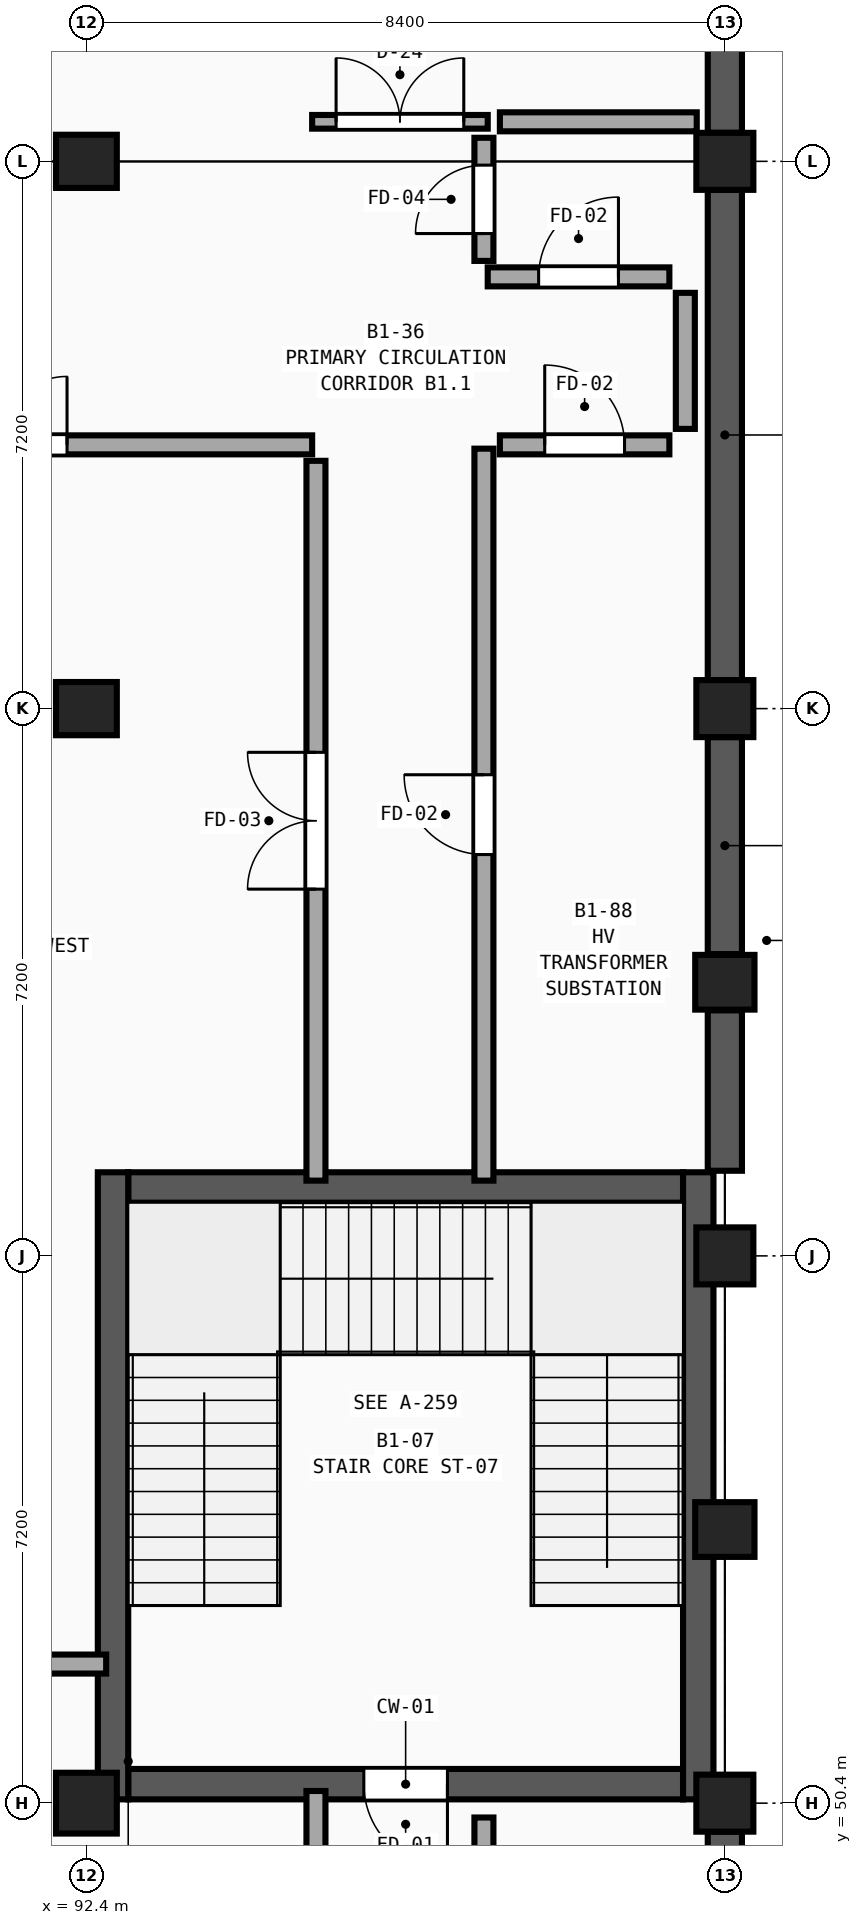
"""IFC4 building model, lengths in metres.
Left out: names, types, materials, properties, quantities, classifications, styles, units other than length and angle.
Written with IfcOpenShell. Run it as: python <this file> out.ifc"""

import sys

from ifc_helpers import new_model, si_unit, direction, frame, frame_2d, origin, origin_2d, place, context, subcontext, project, spatial, rectangle, circle, extrude, element, fill, save


model = new_model("IFC4")
c1 = context("Model", 3, precision=1e-05, world=origin(), true_north=direction((0.0, 1.0)))
c2 = subcontext(c1, "Body", "Model", "MODEL_VIEW")
j1 = project(units=[si_unit("LENGTHUNIT", "METRE"), si_unit("PLANEANGLEUNIT", "RADIAN")], contexts=[c1])
p1 = place(None, origin())
s1 = spatial("IfcSite", under=j1, at=p1, CompositionType="ELEMENT")
p2 = place(p1, origin())
s2 = spatial("IfcBuilding", under=s1, at=p2, CompositionType="ELEMENT")
p3 = place(p2, frame((0.0, 0.0, -5.4)))
s3 = spatial("IfcBuildingStorey", under=s2, at=p3, CompositionType="ELEMENT", Elevation=-5.4)
for number, where, z_axis, x_axis in (
    (1, (92.4, 64.8, 0.0), (0.0, 0.0, 1.0), (1.0, 0.0, 0.0)),
    (2, (92.4, 72.0, 0.0), (0.0, 0.0, 1.0), (1.0, 0.0, 0.0)),
):
    element("IfcColumn", number, at=place(p3, frame(where, z_axis=z_axis, x_axis=x_axis)), inside=s3, PredefinedType="COLUMN", context=c2, shape_type="SweptSolid", body=[
        extrude(rectangle(XDim=0.8, YDim=0.7, at=origin_2d()), origin(), (0.0, 0.0, 1.0), 5.4),
    ])
for number, where, z_axis, x_axis in (
    (3, (100.8, 50.4, 0.0), (0.0, 0.0, 1.0), (1.0, 0.0, 0.0)),
    (4, (100.8, 57.6, 0.0), (0.0, 0.0, 1.0), (1.0, 0.0, 0.0)),
    (5, (100.8, 64.8, 0.0), (0.0, 0.0, 1.0), (1.0, 0.0, 0.0)),
    (6, (100.8, 72.0, 0.0), (0.0, 0.0, 1.0), (1.0, 0.0, 0.0)),
):
    element("IfcColumn", number, at=place(p3, frame(where, z_axis=z_axis, x_axis=x_axis)), inside=s3, PredefinedType="COLUMN", context=c2, shape_type="SweptSolid", body=[
        extrude(rectangle(XDim=0.75, YDim=0.75, at=origin_2d()), origin(), (0.0, 0.0, 1.0), 5.4),
    ])
for number, where, z_axis, x_axis in (
    (7, (100.8, 54.0, 0.0), (0.0, 0.0, 1.0), (1.0, 0.0, 0.0)),
    (8, (100.8, 61.2, 0.0), (0.0, 0.0, 1.0), (1.0, 0.0, 0.0)),
):
    element("IfcColumn", number, at=place(p3, frame(where, z_axis=z_axis, x_axis=x_axis)), inside=s3, PredefinedType="PILASTER", context=c2, shape_type="SweptSolid", body=[
        extrude(rectangle(XDim=0.78, YDim=0.72, at=origin_2d()), origin(), (0.0, 0.0, 1.0), 5.4),
    ])
p4 = place(p3, frame((92.4, 50.4, 0.0), z_axis=(0.0, 0.0, 1.0), x_axis=(1.0, 0.0, 0.0)))
e9 = element("IfcColumn", 9, at=p4, inside=s3, PredefinedType="COLUMN", context=c2, shape_type="SweptSolid", body=[
    extrude(circle(Radius=0.4, at=origin_2d()), origin(), (0.0, 0.0, 1.0), 5.4),
])
p5 = place(p3, frame((100.8, 50.025, 0.0), z_axis=(0.0, 0.0, 1.0), x_axis=(0.0, -1.0, 0.0)))
e10 = element("IfcWall", 10, at=p5, inside=s3, PredefinedType="USERDEFINED", context=c2, shape_type="SweptSolid", body=[
    extrude(rectangle(XDim=6.45, YDim=0.45, at=frame_2d((3.225, 0.0))), origin(), (0.0, 0.0, 1.0), 4.5),
])
p6 = place(p3, frame((100.8, 64.425, 0.0), z_axis=(0.0, 0.0, 1.0), x_axis=(0.0, -1.0, 0.0)))
e11 = element("IfcWall", 11, at=p6, inside=s3, PredefinedType="USERDEFINED", context=c2, shape_type="SweptSolid", body=[
    extrude(rectangle(XDim=2.855, YDim=0.45, at=frame_2d((1.427, 0.0))), origin(), (0.0, 0.0, 1.0), 4.5),
])
p7 = place(p3, frame((100.8, 60.83, 0.0), z_axis=(0.0, 0.0, 1.0), x_axis=(0.0, -1.0, 0.0)))
e12 = element("IfcWall", 12, at=p7, inside=s3, PredefinedType="USERDEFINED", context=c2, shape_type="SweptSolid", body=[
    extrude(rectangle(XDim=2.11, YDim=0.45, at=frame_2d((1.055, 0.0))), origin(), (0.0, 0.0, 1.0), 4.5),
])
for number, where, z_axis, x_axis in (
    (13, (100.8, 71.625, 0.0), (0.0, 0.0, 1.0), (0.0, -1.0, 0.0)),
    (14, (100.8, 78.825, 0.0), (0.0, 0.0, 1.0), (0.0, -1.0, 0.0)),
):
    element("IfcWall", number, at=place(p3, frame(where, z_axis=z_axis, x_axis=x_axis)), inside=s3, PredefinedType="USERDEFINED", context=c2, shape_type="SweptSolid", body=[
        extrude(rectangle(XDim=6.45, YDim=0.45, at=frame_2d((3.225, 0.0))), origin(), (0.0, 0.0, 1.0), 4.5),
    ])
p8 = place(p3, frame((100.25, 50.65, 0.0), z_axis=(0.0, 0.0, 1.0), x_axis=(-1.0, 0.0, 0.0)))
e15 = element("IfcWall", 15, at=p8, inside=s3, PredefinedType="SHEAR", context=c2, shape_type="SweptSolid", body=[
    extrude(rectangle(XDim=7.3, YDim=0.4, at=frame_2d((3.65, 0.0))), origin(), (0.0, 0.0, 1.0), 5.4),
])
p9 = place(p8, frame((3.1, 0.0, 0.0)))
e16 = element("IfcOpeningElement", 16, at=p9, cuts=e15, PredefinedType="OPENING", context=c2, shape_type="SweptSolid", body=[
    extrude(rectangle(XDim=1.1, YDim=2.2, at=frame_2d((0.55, 1.1))), frame((0.0, 0.22, 0.0), z_axis=(0.0, -1.0, 0.0), x_axis=(1.0, 0.0, 0.0)), (0.0, 0.0, 1.0), 0.44),
])
p10 = place(p3, frame((92.95, 58.5, 0.0), z_axis=(0.0, 0.0, 1.0), x_axis=(1.0, 0.0, 0.0)))
e17 = element("IfcWall", 17, at=p10, inside=s3, PredefinedType="SHEAR", context=c2, shape_type="SweptSolid", body=[
    extrude(rectangle(XDim=7.3, YDim=0.4, at=frame_2d((3.65, 0.0))), origin(), (0.0, 0.0, 1.0), 5.4),
])
for number, where, z_axis, x_axis in (
    (18, (92.75, 58.7, 0.0), (0.0, 0.0, 1.0), (0.0, -1.0, 0.0)),
    (19, (100.45, 50.45, 0.0), (0.0, 0.0, 1.0), (0.0, 1.0, 0.0)),
):
    element("IfcWall", number, at=place(p3, frame(where, z_axis=z_axis, x_axis=x_axis)), inside=s3, PredefinedType="SHEAR", context=c2, shape_type="SweptSolid", body=[
        extrude(rectangle(XDim=8.25, YDim=0.4, at=frame_2d((4.125, 0.0))), origin(), (0.0, 0.0, 1.0), 5.4),
    ])
p11 = place(p3, frame((95.42, 36.37, 0.0), z_axis=(0.0, 0.0, 1.0), x_axis=(0.0, 1.0, 0.0)))
e20 = element("IfcWall", 20, at=p11, inside=s3, PredefinedType="SOLIDWALL", context=c2, shape_type="SweptSolid", body=[
    extrude(rectangle(XDim=14.19, YDim=0.25, at=frame_2d((7.095, 0.0))), origin(), (0.0, 0.0, 1.0), 5.05),
])
p12 = place(p11, frame((6.195, 0.0, 0.0)))
e21 = element("IfcOpeningElement", 21, at=p12, cuts=e20, PredefinedType="OPENING", context=c2, shape_type="SweptSolid", body=[
    extrude(rectangle(XDim=1.8, YDim=2.3, at=frame_2d((0.9, 1.15))), frame((0.0, 0.145, 0.0), z_axis=(0.0, -1.0, 0.0), x_axis=(1.0, 0.0, 0.0)), (0.0, 0.0, 1.0), 0.29),
])
p13 = place(p3, frame((97.63, 36.37, 0.0), z_axis=(0.0, 0.0, 1.0), x_axis=(0.0, 1.0, 0.0)))
e22 = element("IfcWall", 22, at=p13, inside=s3, PredefinedType="SOLIDWALL", context=c2, shape_type="SweptSolid", body=[
    extrude(rectangle(XDim=13.841, YDim=0.25, at=frame_2d((6.921, 0.0))), origin(), (0.0, 0.0, 1.0), 5.05),
])
p14 = place(p13, frame((6.396, 0.0, 0.0)))
e23 = element("IfcOpeningElement", 23, at=p14, cuts=e22, PredefinedType="OPENING", context=c2, shape_type="SweptSolid", body=[
    extrude(rectangle(XDim=1.05, YDim=2.15, at=frame_2d((0.525, 1.075))), frame((0.0, 0.145, 0.0), z_axis=(0.0, -1.0, 0.0), x_axis=(1.0, 0.0, 0.0)), (0.0, 0.0, 1.0), 0.29),
])
p15 = place(p3, frame((97.63, 58.59, 0.0), z_axis=(0.0, 0.0, 1.0), x_axis=(0.0, 1.0, 0.0)))
e24 = element("IfcWall", 24, at=p15, inside=s3, PredefinedType="SOLIDWALL", context=c2, shape_type="SweptSolid", body=[
    extrude(rectangle(XDim=9.63, YDim=0.25, at=frame_2d((4.815, 0.0))), origin(), (0.0, 0.0, 1.0), 5.05),
])
p16 = place(p15, frame((4.29, 0.0, 0.0)))
e25 = element("IfcOpeningElement", 25, at=p16, cuts=e24, PredefinedType="OPENING", context=c2, shape_type="SweptSolid", body=[
    extrude(rectangle(XDim=1.05, YDim=2.15, at=frame_2d((0.525, 1.075))), frame((0.0, 0.145, 0.0), z_axis=(0.0, -1.0, 0.0), x_axis=(1.0, 0.0, 0.0)), (0.0, 0.0, 1.0), 0.29),
])
p17 = place(p3, frame((95.42, 58.59, 0.0), z_axis=(0.0, 0.0, 1.0), x_axis=(0.0, 1.0, 0.0)))
e26 = element("IfcWall", 26, at=p17, inside=s3, PredefinedType="SOLIDWALL", context=c2, shape_type="SweptSolid", body=[
    extrude(rectangle(XDim=9.47, YDim=0.25, at=frame_2d((4.735, 0.0))), origin(), (0.0, 0.0, 1.0), 5.05),
])
p18 = place(p17, frame((3.835, 0.0, 0.0)))
e27 = element("IfcOpeningElement", 27, at=p18, cuts=e26, PredefinedType="OPENING", context=c2, shape_type="SweptSolid", body=[
    extrude(rectangle(XDim=1.8, YDim=2.3, at=frame_2d((0.9, 1.15))), frame((0.0, 0.145, 0.0), z_axis=(0.0, -1.0, 0.0), x_axis=(1.0, 0.0, 0.0)), (0.0, 0.0, 1.0), 0.29),
])
p19 = place(p3, frame((87.12, 68.27, 0.0), z_axis=(0.0, 0.0, 1.0), x_axis=(1.0, 0.0, 0.0)))
e28 = element("IfcWall", 28, at=p19, inside=s3, PredefinedType="SOLIDWALL", context=c2, shape_type="SweptSolid", body=[
    extrude(rectangle(XDim=8.25, YDim=0.25, at=frame_2d((4.125, 0.0))), origin(), (0.0, 0.0, 1.0), 5.05),
])
p20 = place(p19, frame((3.225, 0.0, 0.0)))
e29 = element("IfcOpeningElement", 29, at=p20, cuts=e28, PredefinedType="OPENING", context=c2, shape_type="SweptSolid", body=[
    extrude(rectangle(XDim=1.8, YDim=2.3, at=frame_2d((0.9, 1.15))), frame((0.0, 0.145, 0.0), z_axis=(0.0, -1.0, 0.0), x_axis=(1.0, 0.0, 0.0)), (0.0, 0.0, 1.0), 0.29),
])
p21 = place(p3, frame((97.68, 70.48, 0.0), z_axis=(0.0, 0.0, 1.0), x_axis=(1.0, 0.0, 0.0)))
e30 = element("IfcWall", 30, at=p21, inside=s3, PredefinedType="SOLIDWALL", context=c2, shape_type="SweptSolid", body=[
    extrude(rectangle(XDim=2.39, YDim=0.25, at=frame_2d((1.195, 0.0))), origin(), (0.0, 0.0, 1.0), 5.05),
])
p22 = place(p21, frame((0.67, 0.0, 0.0)))
e31 = element("IfcOpeningElement", 31, at=p22, cuts=e30, PredefinedType="OPENING", context=c2, shape_type="SweptSolid", body=[
    extrude(rectangle(XDim=1.05, YDim=2.15, at=frame_2d((0.525, 1.075))), frame((0.0, 0.145, 0.0), z_axis=(0.0, -1.0, 0.0), x_axis=(1.0, 0.0, 0.0)), (0.0, 0.0, 1.0), 0.29),
])
p23 = place(p3, frame((95.37, 72.52, 0.0), z_axis=(0.0, 0.0, 1.0), x_axis=(1.0, 0.0, 0.0)))
e32 = element("IfcWall", 32, at=p23, inside=s3, PredefinedType="PARTITIONING", context=c2, shape_type="SweptSolid", body=[
    extrude(rectangle(XDim=2.31, YDim=0.18, at=frame_2d((1.155, 0.0))), origin(), (0.0, 0.0, 1.0), 4.55),
])
p24 = place(p23, frame((0.315, 0.0, 0.0)))
e33 = element("IfcOpeningElement", 33, at=p24, cuts=e32, PredefinedType="OPENING", context=c2, shape_type="SweptSolid", body=[
    extrude(rectangle(XDim=1.68, YDim=2.29, at=frame_2d((0.84, 1.145))), frame((0.0, 0.11, 0.0), z_axis=(0.0, -1.0, 0.0), x_axis=(1.0, 0.0, 0.0)), (0.0, 0.0, 1.0), 0.22),
])
p25 = place(p3, frame((97.84, 68.27, 0.0), z_axis=(0.0, 0.0, 1.0), x_axis=(1.0, 0.0, 0.0)))
e34 = element("IfcWall", 34, at=p25, inside=s3, PredefinedType="SOLIDWALL", context=c2, shape_type="SweptSolid", body=[
    extrude(rectangle(XDim=2.23, YDim=0.25, at=frame_2d((1.115, 0.0))), origin(), (0.0, 0.0, 1.0), 5.05),
])
p26 = place(p25, frame((0.59, 0.0, 0.0)))
e35 = element("IfcOpeningElement", 35, at=p26, cuts=e34, PredefinedType="OPENING", context=c2, shape_type="SweptSolid", body=[
    extrude(rectangle(XDim=1.05, YDim=2.15, at=frame_2d((0.525, 1.075))), frame((0.0, 0.145, 0.0), z_axis=(0.0, -1.0, 0.0), x_axis=(1.0, 0.0, 0.0)), (0.0, 0.0, 1.0), 0.29),
])
p27 = place(p3, frame((100.28, 68.48, 0.0), z_axis=(0.0, 0.0, 1.0), x_axis=(0.0, 1.0, 0.0)))
e36 = element("IfcWall", 36, at=p27, inside=s3, PredefinedType="SOLIDWALL", context=c2, shape_type="SweptSolid", body=[
    extrude(rectangle(XDim=1.79, YDim=0.25, at=frame_2d((0.895, 0.0))), origin(), (0.0, 0.0, 1.0), 4.5),
])
p28 = place(p3, frame((97.63, 70.69, 0.0), z_axis=(0.0, 0.0, 1.0), x_axis=(0.0, 1.0, 0.0)))
e37 = element("IfcWall", 37, at=p28, inside=s3, PredefinedType="SOLIDWALL", context=c2, shape_type="SweptSolid", body=[
    extrude(rectangle(XDim=1.62, YDim=0.25, at=frame_2d((0.81, 0.0))), origin(), (0.0, 0.0, 1.0), 5.05),
])
p29 = place(p28, frame((0.36, 0.0, 0.0)))
e38 = element("IfcOpeningElement", 38, at=p29, cuts=e37, PredefinedType="OPENING", context=c2, shape_type="SweptSolid", body=[
    extrude(rectangle(XDim=0.9, YDim=2.1, at=frame_2d((0.45, 1.05))), frame((0.0, 0.145, 0.0), z_axis=(0.0, -1.0, 0.0), x_axis=(1.0, 0.0, 0.0)), (0.0, 0.0, 1.0), 0.29),
])
p30 = place(p3, frame((87.38, 52.23, 0.0), z_axis=(0.0, 0.0, 1.0), x_axis=(1.0, 0.0, 0.0)))
e39 = element("IfcWall", 39, at=p30, inside=s3, PredefinedType="SOLIDWALL", context=c2, shape_type="SweptSolid", body=[
    extrude(rectangle(XDim=5.28, YDim=0.25, at=frame_2d((2.64, 0.0))), origin(), (0.0, 0.0, 1.0), 5.05),
])
p31 = place(p3, frame((97.84, 72.52, 0.0), z_axis=(0.0, 0.0, 1.0), x_axis=(1.0, 0.0, 0.0)))
e40 = element("IfcWall", 40, at=p31, inside=s3, PredefinedType="SOLIDWALL", context=c2, shape_type="SweptSolid", body=[
    extrude(rectangle(XDim=2.59, YDim=0.25, at=frame_2d((1.295, 0.0))), origin(), (0.0, 0.0, 1.0), 4.55),
])
p32 = place(p9, origin())
e41 = element("IfcDoor", 41, at=p32, inside=s3, OperationType="SINGLE_SWING_LEFT", PredefinedType="DOOR", context=c2, shape_type="SweptSolid", body=[
    extrude(rectangle(XDim=1.1, YDim=2.2, at=frame_2d((0.55, 1.1))), frame((0.0, 0.025, 0.0), z_axis=(0.0, -1.0, 0.0), x_axis=(1.0, 0.0, 0.0)), (0.0, 0.0, 1.0), 0.05),
])
fill(e16, e41)
p33 = place(p16, origin())
e42 = element("IfcDoor", 42, at=p33, inside=s3, OperationType="SINGLE_SWING_RIGHT", PredefinedType="DOOR", context=c2, shape_type="SweptSolid", body=[
    extrude(rectangle(XDim=1.05, YDim=2.15, at=frame_2d((0.525, 1.075))), frame((0.0, 0.025, 0.0), z_axis=(0.0, -1.0, 0.0), x_axis=(1.0, 0.0, 0.0)), (0.0, 0.0, 1.0), 0.05),
])
fill(e25, e42)
p34 = place(p18, origin())
e43 = element("IfcDoor", 43, at=p34, inside=s3, OperationType="DOUBLE_DOOR_SINGLE_SWING", PredefinedType="DOOR", context=c2, shape_type="SweptSolid", body=[
    extrude(rectangle(XDim=1.8, YDim=2.3, at=frame_2d((0.9, 1.15))), frame((0.0, 0.025, 0.0), z_axis=(0.0, -1.0, 0.0), x_axis=(1.0, 0.0, 0.0)), (0.0, 0.0, 1.0), 0.05),
])
fill(e27, e43)
p35 = place(p20, origin())
e44 = element("IfcDoor", 44, at=p35, inside=s3, OperationType="DOUBLE_DOOR_SINGLE_SWING", PredefinedType="DOOR", context=c2, shape_type="SweptSolid", body=[
    extrude(rectangle(XDim=1.8, YDim=2.3, at=frame_2d((0.9, 1.15))), frame((0.0, 0.025, 0.0), z_axis=(0.0, -1.0, 0.0), x_axis=(1.0, 0.0, 0.0)), (0.0, 0.0, 1.0), 0.05),
])
fill(e29, e44)
p36 = place(p22, origin())
e45 = element("IfcDoor", 45, at=p36, inside=s3, OperationType="SINGLE_SWING_RIGHT", PredefinedType="DOOR", context=c2, shape_type="SweptSolid", body=[
    extrude(rectangle(XDim=1.05, YDim=2.15, at=frame_2d((0.525, 1.075))), frame((0.0, 0.025, 0.0), z_axis=(0.0, -1.0, 0.0), x_axis=(1.0, 0.0, 0.0)), (0.0, 0.0, 1.0), 0.05),
])
fill(e31, e45)
p37 = place(p24, origin())
e46 = element("IfcDoor", 46, at=p37, inside=s3, OperationType="DOUBLE_DOOR_SINGLE_SWING", PredefinedType="DOOR", context=c2, shape_type="SweptSolid", body=[
    extrude(rectangle(XDim=1.68, YDim=2.29, at=frame_2d((0.84, 1.145))), frame((0.0, 0.025, 0.0), z_axis=(0.0, -1.0, 0.0), x_axis=(1.0, 0.0, 0.0)), (0.0, 0.0, 1.0), 0.05),
])
fill(e33, e46)
p38 = place(p26, origin())
e47 = element("IfcDoor", 47, at=p38, inside=s3, OperationType="SINGLE_SWING_LEFT", PredefinedType="DOOR", context=c2, shape_type="SweptSolid", body=[
    extrude(rectangle(XDim=1.05, YDim=2.15, at=frame_2d((0.525, 1.075))), frame((0.0, 0.025, 0.0), z_axis=(0.0, -1.0, 0.0), x_axis=(1.0, 0.0, 0.0)), (0.0, 0.0, 1.0), 0.05),
])
fill(e35, e47)
p39 = place(p29, origin())
e48 = element("IfcDoor", 48, at=p39, inside=s3, OperationType="SINGLE_SWING_LEFT", PredefinedType="DOOR", context=c2, shape_type="SweptSolid", body=[
    extrude(rectangle(XDim=0.9, YDim=2.1, at=frame_2d((0.45, 1.05))), frame((0.0, 0.025, 0.0), z_axis=(0.0, -1.0, 0.0), x_axis=(1.0, 0.0, 0.0)), (0.0, 0.0, 1.0), 0.05),
])
fill(e38, e48)
save(model, sys.argv[1])
